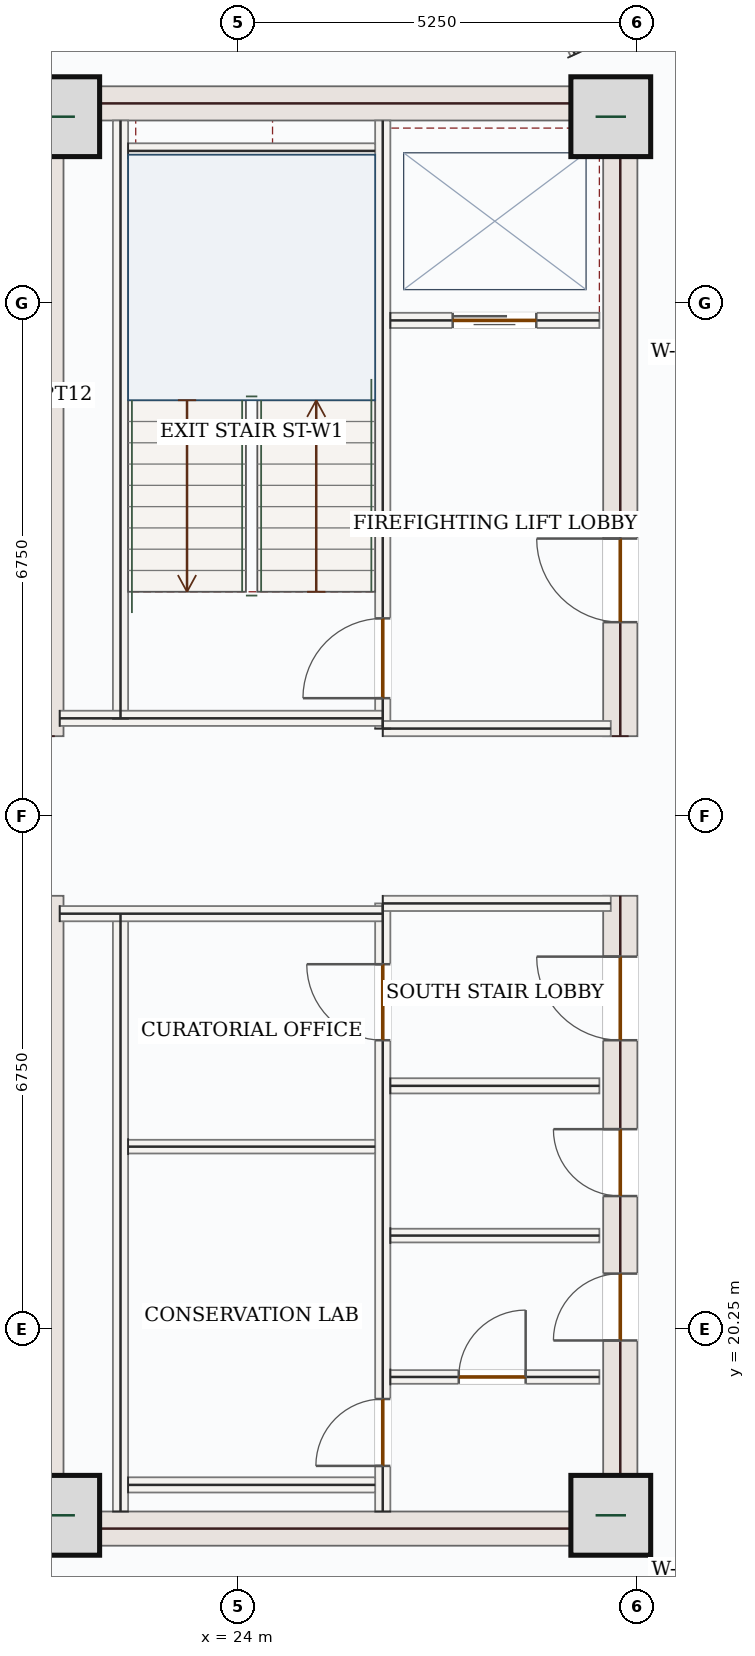
"""IFC4 building model, lengths in metres.
Left out: names, types, materials, properties, quantities, classifications, styles, units other than length and angle.
Written with IfcOpenShell. Run it as: python <this file> out.ifc"""

import sys

from ifc_helpers import new_model, si_unit, direction, frame, frame_2d, origin, origin_2d, place, context, subcontext, project, spatial, rectangle, extrude, source, transform, mapped, element, fill, save


model = new_model("IFC4")
c1 = context("Model", 3, precision=1e-05, world=origin(), true_north=direction((0.0, 1.0)))
c2 = subcontext(c1, "Body", "Model", "MODEL_VIEW")
j1 = project(units=[si_unit("LENGTHUNIT", "METRE"), si_unit("PLANEANGLEUNIT", "RADIAN")], contexts=[c1])
p1 = place(None, origin())
s1 = spatial("IfcSite", under=j1, at=p1, CompositionType="ELEMENT")
p2 = place(p1, origin())
s2 = spatial("IfcBuilding", under=s1, at=p2, CompositionType="ELEMENT")
p3 = place(p2, frame((0.0, 0.0, 242.85)))
s3 = spatial("IfcBuildingStorey", under=s2, at=p3, CompositionType="ELEMENT", Elevation=242.85)
m1 = source(origin(), c2, "Body", "SweptSolid", [
    extrude(rectangle(XDim=8.55, YDim=0.45, at=frame_2d((4.275, 0.0))), origin(), (0.0, 0.0, 1.0), 3.5),
])
for number, where, z_axis, x_axis in (
    (1, (21.475, 17.4, 0.0), (0.0, 0.0, 1.0), (0.0, 1.0, 0.0)),
    (2, (21.475, 28.05, 0.0), (0.0, 0.0, 1.0), (0.0, 1.0, 0.0)),
):
    element("IfcWall", number, at=place(p3, frame(where, z_axis=z_axis, x_axis=x_axis)), inside=s3, PredefinedType="SHEAR", context=c2, shape_type="MappedRepresentation", body=[
        mapped(m1, transform((0.0, 0.0, 0.0), x_axis=(1.0, 0.0, 0.0), y_axis=(0.0, 1.0, 0.0), z_axis=(0.0, 0.0, 1.0), scale=1.0)),
    ])
p4 = place(p3, frame((29.025, 17.4, 0.0), z_axis=(0.0, 0.0, 1.0), x_axis=(0.0, 1.0, 0.0)))
e3 = element("IfcWall", 3, at=p4, inside=s3, PredefinedType="SHEAR", context=c2, shape_type="SweptSolid", body=[
    extrude(rectangle(XDim=8.55, YDim=0.45, at=frame_2d((4.275, 0.0))), origin(), (0.0, 0.0, 1.0), 3.5),
])
p5 = place(p4, frame((6.65, 0.0, 0.0)))
e4 = element("IfcOpeningElement", 4, at=p5, cuts=e3, PredefinedType="OPENING", context=c2, shape_type="SweptSolid", body=[
    extrude(rectangle(XDim=1.1, YDim=2.2, at=frame_2d((0.55, 1.1))), frame((0.0, 0.235, 0.0), z_axis=(0.0, -1.0, 0.0), x_axis=(1.0, 0.0, 0.0)), (0.0, 0.0, 1.0), 0.47),
])
p6 = place(p4, frame((2.7, 0.0, 0.0)))
e5 = element("IfcOpeningElement", 5, at=p6, cuts=e3, PredefinedType="OPENING", context=c2, shape_type="SweptSolid", body=[
    extrude(rectangle(XDim=0.88, YDim=2.1, at=frame_2d((0.44, 1.05))), frame((0.0, 0.235, 0.0), z_axis=(0.0, -1.0, 0.0), x_axis=(1.0, 0.0, 0.0)), (0.0, 0.0, 1.0), 0.47),
])
p7 = place(p4, frame((4.6, 0.0, 0.0)))
e6 = element("IfcOpeningElement", 6, at=p7, cuts=e3, PredefinedType="OPENING", context=c2, shape_type="SweptSolid", body=[
    extrude(rectangle(XDim=0.88, YDim=2.1, at=frame_2d((0.44, 1.05))), frame((0.0, 0.235, 0.0), z_axis=(0.0, -1.0, 0.0), x_axis=(1.0, 0.0, 0.0)), (0.0, 0.0, 1.0), 0.47),
])
p8 = place(p3, frame((29.025, 28.05, 0.0), z_axis=(0.0, 0.0, 1.0), x_axis=(0.0, 1.0, 0.0)))
e7 = element("IfcWall", 7, at=p8, inside=s3, PredefinedType="SHEAR", context=c2, shape_type="SweptSolid", body=[
    extrude(rectangle(XDim=8.55, YDim=0.45, at=frame_2d((4.275, 0.0))), origin(), (0.0, 0.0, 1.0), 3.5),
])
p9 = place(p8, frame((1.5, 0.0, 0.0)))
e8 = element("IfcOpeningElement", 8, at=p9, cuts=e7, PredefinedType="OPENING", context=c2, shape_type="SweptSolid", body=[
    extrude(rectangle(XDim=1.1, YDim=2.2, at=frame_2d((0.55, 1.1))), frame((0.0, 0.235, 0.0), z_axis=(0.0, -1.0, 0.0), x_axis=(1.0, 0.0, 0.0)), (0.0, 0.0, 1.0), 0.47),
])
m2 = source(origin(), c2, "Body", "SweptSolid", [
    extrude(rectangle(XDim=7.1, YDim=0.45, at=frame_2d((3.55, 0.0))), origin(), (0.0, 0.0, 1.0), 3.5),
])
for number, where, z_axis, x_axis in (
    (9, (21.7, 17.625, 0.0), (0.0, 0.0, 1.0), (1.0, 0.0, 0.0)),
    (10, (21.7, 36.375, 0.0), (0.0, 0.0, 1.0), (1.0, 0.0, 0.0)),
):
    element("IfcWall", number, at=place(p3, frame(where, z_axis=z_axis, x_axis=x_axis)), inside=s3, PredefinedType="SHEAR", context=c2, shape_type="MappedRepresentation", body=[
        mapped(m2, transform((0.0, 0.0, 0.0), x_axis=(1.0, 0.0, 0.0), y_axis=(0.0, 1.0, 0.0), z_axis=(0.0, 0.0, 1.0), scale=1.0)),
    ])
m3 = source(origin(), c2, "Body", "SweptSolid", [
    extrude(rectangle(XDim=1.05, YDim=1.05, at=origin_2d()), origin(), (0.0, 0.0, 1.0), 3.75),
])
for number, where, z_axis, x_axis in (
    (11, (21.65, 17.8, 0.0), (0.0, 0.0, 1.0), (1.0, 0.0, 0.0)),
    (12, (28.9, 17.8, 0.0), (0.0, 0.0, 1.0), (1.0, 0.0, 0.0)),
    (13, (21.65, 36.2, 0.0), (0.0, 0.0, 1.0), (1.0, 0.0, 0.0)),
    (14, (28.9, 36.2, 0.0), (0.0, 0.0, 1.0), (1.0, 0.0, 0.0)),
):
    element("IfcColumn", number, at=place(p3, frame(where, z_axis=z_axis, x_axis=x_axis)), inside=s3, PredefinedType="COLUMN", context=c2, shape_type="MappedRepresentation", body=[
        mapped(m3, transform((0.0, 0.0, 0.0), x_axis=(1.0, 0.0, 0.0), y_axis=(0.0, 1.0, 0.0), z_axis=(0.0, 0.0, 1.0), scale=1.0)),
    ])
m4 = source(origin(), c2, "Body", "SweptSolid", [
    extrude(rectangle(XDim=5.258, YDim=0.28, at=frame_2d((2.629, 0.0))), origin(), (0.0, 0.0, 1.0), 3.5),
])
p10 = place(p3, frame((18.94, 35.542, 0.0), z_axis=(0.0, 0.0, 1.0), x_axis=(0.707106781187, 0.707106781187, 0.0)))
e15 = element("IfcWall", 15, at=p10, inside=s3, PredefinedType="SOLIDWALL", context=c2, shape_type="MappedRepresentation", body=[
    mapped(m4, transform((0.0, 0.0, 0.0), x_axis=(1.0, 0.0, 0.0), y_axis=(0.0, 1.0, 0.0), z_axis=(0.0, 0.0, 1.0), scale=1.0)),
])
m5 = source(origin(), c2, "Body", "SweptSolid", [
    extrude(rectangle(XDim=7.87, YDim=0.2, at=frame_2d((3.935, 0.0))), origin(), (0.0, 0.0, 1.0), 3.5),
])
for number, where, z_axis, x_axis in (
    (16, (22.45, 17.85, 0.0), (0.0, 0.0, 1.0), (0.0, 1.0, 0.0)),
    (17, (22.45, 28.28, 0.0), (0.0, 0.0, 1.0), (0.0, 1.0, 0.0)),
):
    element("IfcWall", number, at=place(p3, frame(where, z_axis=z_axis, x_axis=x_axis)), inside=s3, PredefinedType="SOLIDWALL", context=c2, shape_type="MappedRepresentation", body=[
        mapped(m5, transform((0.0, 0.0, 0.0), x_axis=(1.0, 0.0, 0.0), y_axis=(0.0, 1.0, 0.0), z_axis=(0.0, 0.0, 1.0), scale=1.0)),
    ])
p11 = place(p3, frame((25.9, 17.85, 0.0), z_axis=(0.0, 0.0, 1.0), x_axis=(0.0, 1.0, 0.0)))
e18 = element("IfcWall", 18, at=p11, inside=s3, PredefinedType="SOLIDWALL", context=c2, shape_type="SweptSolid", body=[
    extrude(rectangle(XDim=8.0, YDim=0.2, at=frame_2d((4.0, 0.0))), origin(), (0.0, 0.0, 1.0), 3.5),
])
p12 = place(p11, frame((6.2, 0.0, 0.0)))
e19 = element("IfcOpeningElement", 19, at=p12, cuts=e18, PredefinedType="OPENING", context=c2, shape_type="SweptSolid", body=[
    extrude(rectangle(XDim=1.0, YDim=2.15, at=frame_2d((0.5, 1.075))), frame((0.0, 0.11, 0.0), z_axis=(0.0, -1.0, 0.0), x_axis=(1.0, 0.0, 0.0)), (0.0, 0.0, 1.0), 0.22),
])
p13 = place(p11, frame((0.6, 0.0, 0.0)))
e20 = element("IfcOpeningElement", 20, at=p13, cuts=e18, PredefinedType="OPENING", context=c2, shape_type="SweptSolid", body=[
    extrude(rectangle(XDim=0.88, YDim=2.1, at=frame_2d((0.44, 1.05))), frame((0.0, 0.11, 0.0), z_axis=(0.0, -1.0, 0.0), x_axis=(1.0, 0.0, 0.0)), (0.0, 0.0, 1.0), 0.22),
])
p14 = place(p3, frame((25.9, 28.15, 0.0), z_axis=(0.0, 0.0, 1.0), x_axis=(0.0, 1.0, 0.0)))
e21 = element("IfcWall", 21, at=p14, inside=s3, PredefinedType="SOLIDWALL", context=c2, shape_type="SweptSolid", body=[
    extrude(rectangle(XDim=8.0, YDim=0.2, at=frame_2d((4.0, 0.0))), origin(), (0.0, 0.0, 1.0), 3.5),
])
p15 = place(p14, frame((0.4, 0.0, 0.0)))
e22 = element("IfcOpeningElement", 22, at=p15, cuts=e21, PredefinedType="OPENING", context=c2, shape_type="SweptSolid", body=[
    extrude(rectangle(XDim=1.05, YDim=2.15, at=frame_2d((0.525, 1.075))), frame((0.0, 0.11, 0.0), z_axis=(0.0, -1.0, 0.0), x_axis=(1.0, 0.0, 0.0)), (0.0, 0.0, 1.0), 0.22),
])
m6 = source(origin(), c2, "Body", "SweptSolid", [
    extrude(rectangle(XDim=4.25, YDim=0.2, at=frame_2d((2.125, 0.0))), origin(), (0.0, 0.0, 1.0), 3.5),
])
p16 = place(p3, frame((21.65, 25.715, 0.0), z_axis=(0.0, 0.0, 1.0), x_axis=(1.0, 0.0, 0.0)))
e23 = element("IfcWall", 23, at=p16, inside=s3, PredefinedType="SOLIDWALL", context=c2, shape_type="MappedRepresentation", body=[
    mapped(m6, transform((0.0, 0.0, 0.0), x_axis=(1.0, 0.0, 0.0), y_axis=(0.0, 1.0, 0.0), z_axis=(0.0, 0.0, 1.0), scale=1.0)),
])
m7 = source(origin(), c2, "Body", "SweptSolid", [
    extrude(rectangle(XDim=3.0, YDim=0.2, at=frame_2d((1.5, 0.0))), origin(), (0.0, 0.0, 1.0), 3.5),
])
p17 = place(p3, frame((25.9, 25.85, 0.0), z_axis=(0.0, 0.0, 1.0), x_axis=(1.0, 0.0, 0.0)))
e24 = element("IfcWall", 24, at=p17, inside=s3, PredefinedType="SOLIDWALL", context=c2, shape_type="MappedRepresentation", body=[
    mapped(m7, transform((0.0, 0.0, 0.0), x_axis=(1.0, 0.0, 0.0), y_axis=(0.0, 1.0, 0.0), z_axis=(0.0, 0.0, 1.0), scale=1.0)),
])
p18 = place(p3, frame((21.65, 28.285, 0.0), z_axis=(0.0, 0.0, 1.0), x_axis=(1.0, 0.0, 0.0)))
e25 = element("IfcWall", 25, at=p18, inside=s3, PredefinedType="SOLIDWALL", context=c2, shape_type="MappedRepresentation", body=[
    mapped(m6, transform((0.0, 0.0, 0.0), x_axis=(1.0, 0.0, 0.0), y_axis=(0.0, 1.0, 0.0), z_axis=(0.0, 0.0, 1.0), scale=1.0)),
])
p19 = place(p3, frame((25.9, 28.15, 0.0), z_axis=(0.0, 0.0, 1.0), x_axis=(1.0, 0.0, 0.0)))
e26 = element("IfcWall", 26, at=p19, inside=s3, PredefinedType="SOLIDWALL", context=c2, shape_type="MappedRepresentation", body=[
    mapped(m7, transform((0.0, 0.0, 0.0), x_axis=(1.0, 0.0, 0.0), y_axis=(0.0, 1.0, 0.0), z_axis=(0.0, 0.0, 1.0), scale=1.0)),
])
m8 = source(origin(), c2, "Body", "SweptSolid", [
    extrude(rectangle(XDim=3.25, YDim=0.2, at=frame_2d((1.625, 0.0))), origin(), (0.0, 0.0, 1.0), 3.5),
])
for number, where, z_axis, x_axis in (
    (27, (22.55, 35.75, 0.0), (0.0, 0.0, 1.0), (1.0, 0.0, 0.0)),
    (28, (22.55, 18.2, 0.0), (0.0, 0.0, 1.0), (1.0, 0.0, 0.0)),
):
    element("IfcWall", number, at=place(p3, frame(where, z_axis=z_axis, x_axis=x_axis)), inside=s3, PredefinedType="SOLIDWALL", context=c2, shape_type="MappedRepresentation", body=[
        mapped(m8, transform((0.0, 0.0, 0.0), x_axis=(1.0, 0.0, 0.0), y_axis=(0.0, 1.0, 0.0), z_axis=(0.0, 0.0, 1.0), scale=1.0)),
    ])
m9 = source(origin(), c2, "Body", "SweptSolid", [
    extrude(rectangle(XDim=3.25, YDim=0.18, at=frame_2d((1.625, 0.0))), origin(), (0.0, 0.0, 1.0), 3.5),
])
p20 = place(p3, frame((22.55, 22.65, 0.0), z_axis=(0.0, 0.0, 1.0), x_axis=(1.0, 0.0, 0.0)))
e29 = element("IfcWall", 29, at=p20, inside=s3, PredefinedType="PARTITIONING", context=c2, shape_type="MappedRepresentation", body=[
    mapped(m9, transform((0.0, 0.0, 0.0), x_axis=(1.0, 0.0, 0.0), y_axis=(0.0, 1.0, 0.0), z_axis=(0.0, 0.0, 1.0), scale=1.0)),
])
p21 = place(p3, frame((26.0, 33.52, 0.0), z_axis=(0.0, 0.0, 1.0), x_axis=(1.0, 0.0, 0.0)))
e30 = element("IfcWall", 30, at=p21, inside=s3, PredefinedType="SOLIDWALL", context=c2, shape_type="SweptSolid", body=[
    extrude(rectangle(XDim=2.75, YDim=0.2, at=frame_2d((1.375, 0.0))), origin(), (0.0, 0.0, 1.0), 3.5),
])
p22 = place(p21, frame((0.82, 0.0, 0.0)))
e31 = element("IfcOpeningElement", 31, at=p22, cuts=e30, PredefinedType="OPENING", context=c2, shape_type="SweptSolid", body=[
    extrude(rectangle(XDim=1.1, YDim=2.15, at=frame_2d((0.55, 1.075))), frame((0.0, 0.11, 0.0), z_axis=(0.0, -1.0, 0.0), x_axis=(1.0, 0.0, 0.0)), (0.0, 0.0, 1.0), 0.22),
])
m10 = source(origin(), c2, "Body", "SweptSolid", [
    extrude(rectangle(XDim=2.75, YDim=0.2, at=frame_2d((1.375, 0.0))), origin(), (0.0, 0.0, 1.0), 3.5),
])
p23 = place(p3, frame((26.0, 23.45, 0.0), z_axis=(0.0, 0.0, 1.0), x_axis=(1.0, 0.0, 0.0)))
e32 = element("IfcWall", 32, at=p23, inside=s3, PredefinedType="SOLIDWALL", context=c2, shape_type="MappedRepresentation", body=[
    mapped(m10, transform((0.0, 0.0, 0.0), x_axis=(1.0, 0.0, 0.0), y_axis=(0.0, 1.0, 0.0), z_axis=(0.0, 0.0, 1.0), scale=1.0)),
])
p24 = place(p3, frame((26.0, 19.62, 0.0), z_axis=(0.0, 0.0, 1.0), x_axis=(1.0, 0.0, 0.0)))
e33 = element("IfcWall", 33, at=p24, inside=s3, PredefinedType="PARTITIONING", context=c2, shape_type="SweptSolid", body=[
    extrude(rectangle(XDim=2.75, YDim=0.18, at=frame_2d((1.375, 0.0))), origin(), (0.0, 0.0, 1.0), 3.5),
])
p25 = place(p24, frame((0.9, 0.0, 0.0)))
e34 = element("IfcOpeningElement", 34, at=p25, cuts=e33, PredefinedType="OPENING", context=c2, shape_type="SweptSolid", body=[
    extrude(rectangle(XDim=0.88, YDim=2.1, at=frame_2d((0.44, 1.05))), frame((0.0, 0.1, 0.0), z_axis=(0.0, -1.0, 0.0), x_axis=(1.0, 0.0, 0.0)), (0.0, 0.0, 1.0), 0.2),
])
m11 = source(origin(), c2, "Body", "SweptSolid", [
    extrude(rectangle(XDim=2.75, YDim=0.18, at=frame_2d((1.375, 0.0))), origin(), (0.0, 0.0, 1.0), 3.5),
])
p26 = place(p3, frame((26.0, 21.48, 0.0), z_axis=(0.0, 0.0, 1.0), x_axis=(1.0, 0.0, 0.0)))
e35 = element("IfcWall", 35, at=p26, inside=s3, PredefinedType="PARTITIONING", context=c2, shape_type="MappedRepresentation", body=[
    mapped(m11, transform((0.0, 0.0, 0.0), x_axis=(1.0, 0.0, 0.0), y_axis=(0.0, 1.0, 0.0), z_axis=(0.0, 0.0, 1.0), scale=1.0)),
])
m12 = source(origin(), c2, "Body", "SweptSolid", [
    extrude(rectangle(XDim=8.701, YDim=0.125, at=frame_2d((4.351, 0.0))), origin(), (0.0, 0.0, 1.0), 3.5),
])
p27 = place(p3, frame((28.429, 37.02, 0.0), z_axis=(0.0, 0.0, 1.0), x_axis=(-0.419458495046, 0.907774515468, 0.0)))
e36 = element("IfcWall", 36, at=p27, inside=s3, PredefinedType="PARTITIONING", context=c2, shape_type="MappedRepresentation", body=[
    mapped(m12, transform((0.0, 0.0, 0.0), x_axis=(1.0, 0.0, 0.0), y_axis=(0.0, 1.0, 0.0), z_axis=(0.0, 0.0, 1.0), scale=1.0)),
])
m13 = source(origin(), c2, "Body", "SweptSolid", [
    extrude(rectangle(XDim=1.05, YDim=2.15, at=frame_2d((0.525, 1.075))), frame((0.0, 0.025, 0.0), z_axis=(0.0, -1.0, 0.0), x_axis=(1.0, 0.0, 0.0)), (0.0, 0.0, 1.0), 0.05),
])
p28 = place(p15, origin())
e37 = element("IfcDoor", 37, at=p28, inside=s3, OperationType="SINGLE_SWING_LEFT", PredefinedType="DOOR", context=c2, shape_type="MappedRepresentation", body=[
    mapped(m13, transform((0.0, 0.0, 0.0), x_axis=(1.0, 0.0, 0.0), y_axis=(0.0, 1.0, 0.0), z_axis=(0.0, 0.0, 1.0), scale=1.0)),
])
fill(e22, e37)
m14 = source(origin(), c2, "Body", "SweptSolid", [
    extrude(rectangle(XDim=1.0, YDim=2.15, at=frame_2d((0.5, 1.075))), frame((0.0, 0.025, 0.0), z_axis=(0.0, -1.0, 0.0), x_axis=(1.0, 0.0, 0.0)), (0.0, 0.0, 1.0), 0.05),
])
p29 = place(p12, origin())
e38 = element("IfcDoor", 38, at=p29, inside=s3, OperationType="SINGLE_SWING_RIGHT", PredefinedType="DOOR", context=c2, shape_type="MappedRepresentation", body=[
    mapped(m14, transform((0.0, 0.0, 0.0), x_axis=(1.0, 0.0, 0.0), y_axis=(0.0, 1.0, 0.0), z_axis=(0.0, 0.0, 1.0), scale=1.0)),
])
fill(e19, e38)
m15 = source(origin(), c2, "Body", "SweptSolid", [
    extrude(rectangle(XDim=0.88, YDim=2.1, at=frame_2d((0.44, 1.05))), frame((0.0, 0.025, 0.0), z_axis=(0.0, -1.0, 0.0), x_axis=(1.0, 0.0, 0.0)), (0.0, 0.0, 1.0), 0.05),
])
p30 = place(p13, origin())
e39 = element("IfcDoor", 39, at=p30, inside=s3, OperationType="SINGLE_SWING_LEFT", PredefinedType="DOOR", context=c2, shape_type="MappedRepresentation", body=[
    mapped(m15, transform((0.0, 0.0, 0.0), x_axis=(1.0, 0.0, 0.0), y_axis=(0.0, 1.0, 0.0), z_axis=(0.0, 0.0, 1.0), scale=1.0)),
])
fill(e20, e39)
m16 = source(origin(), c2, "Body", "SweptSolid", [
    extrude(rectangle(XDim=1.1, YDim=2.15, at=frame_2d((0.55, 1.075))), frame((0.0, 0.025, 0.0), z_axis=(0.0, -1.0, 0.0), x_axis=(1.0, 0.0, 0.0)), (0.0, 0.0, 1.0), 0.05),
])
p31 = place(p22, origin())
e40 = element("IfcDoor", 40, at=p31, inside=s3, OperationType="DOUBLE_DOOR_SLIDING", PredefinedType="DOOR", context=c2, shape_type="MappedRepresentation", body=[
    mapped(m16, transform((0.0, 0.0, 0.0), x_axis=(1.0, 0.0, 0.0), y_axis=(0.0, 1.0, 0.0), z_axis=(0.0, 0.0, 1.0), scale=1.0)),
])
fill(e31, e40)
m17 = source(origin(), c2, "Body", "SweptSolid", [
    extrude(rectangle(XDim=1.1, YDim=2.2, at=frame_2d((0.55, 1.1))), frame((0.0, 0.025, 0.0), z_axis=(0.0, -1.0, 0.0), x_axis=(1.0, 0.0, 0.0)), (0.0, 0.0, 1.0), 0.05),
])
p32 = place(p9, origin())
e41 = element("IfcDoor", 41, at=p32, inside=s3, OperationType="SINGLE_SWING_RIGHT", PredefinedType="DOOR", context=c2, shape_type="MappedRepresentation", body=[
    mapped(m17, transform((0.0, 0.0, 0.0), x_axis=(1.0, 0.0, 0.0), y_axis=(0.0, 1.0, 0.0), z_axis=(0.0, 0.0, 1.0), scale=1.0)),
])
fill(e8, e41)
p33 = place(p5, origin())
e42 = element("IfcDoor", 42, at=p33, inside=s3, OperationType="SINGLE_SWING_RIGHT", PredefinedType="DOOR", context=c2, shape_type="MappedRepresentation", body=[
    mapped(m17, transform((0.0, 0.0, 0.0), x_axis=(1.0, 0.0, 0.0), y_axis=(0.0, 1.0, 0.0), z_axis=(0.0, 0.0, 1.0), scale=1.0)),
])
fill(e4, e42)
p34 = place(p25, origin())
e43 = element("IfcDoor", 43, at=p34, inside=s3, OperationType="SINGLE_SWING_RIGHT", PredefinedType="DOOR", context=c2, shape_type="MappedRepresentation", body=[
    mapped(m15, transform((0.0, 0.0, 0.0), x_axis=(1.0, 0.0, 0.0), y_axis=(0.0, 1.0, 0.0), z_axis=(0.0, 0.0, 1.0), scale=1.0)),
])
fill(e34, e43)
p35 = place(p6, origin())
e44 = element("IfcDoor", 44, at=p35, inside=s3, OperationType="SINGLE_SWING_LEFT", PredefinedType="DOOR", context=c2, shape_type="MappedRepresentation", body=[
    mapped(m15, transform((0.0, 0.0, 0.0), x_axis=(1.0, 0.0, 0.0), y_axis=(0.0, 1.0, 0.0), z_axis=(0.0, 0.0, 1.0), scale=1.0)),
])
fill(e5, e44)
p36 = place(p7, origin())
e45 = element("IfcDoor", 45, at=p36, inside=s3, OperationType="SINGLE_SWING_RIGHT", PredefinedType="DOOR", context=c2, shape_type="MappedRepresentation", body=[
    mapped(m15, transform((0.0, 0.0, 0.0), x_axis=(1.0, 0.0, 0.0), y_axis=(0.0, 1.0, 0.0), z_axis=(0.0, 0.0, 1.0), scale=1.0)),
])
fill(e6, e45)
save(model, sys.argv[1])
